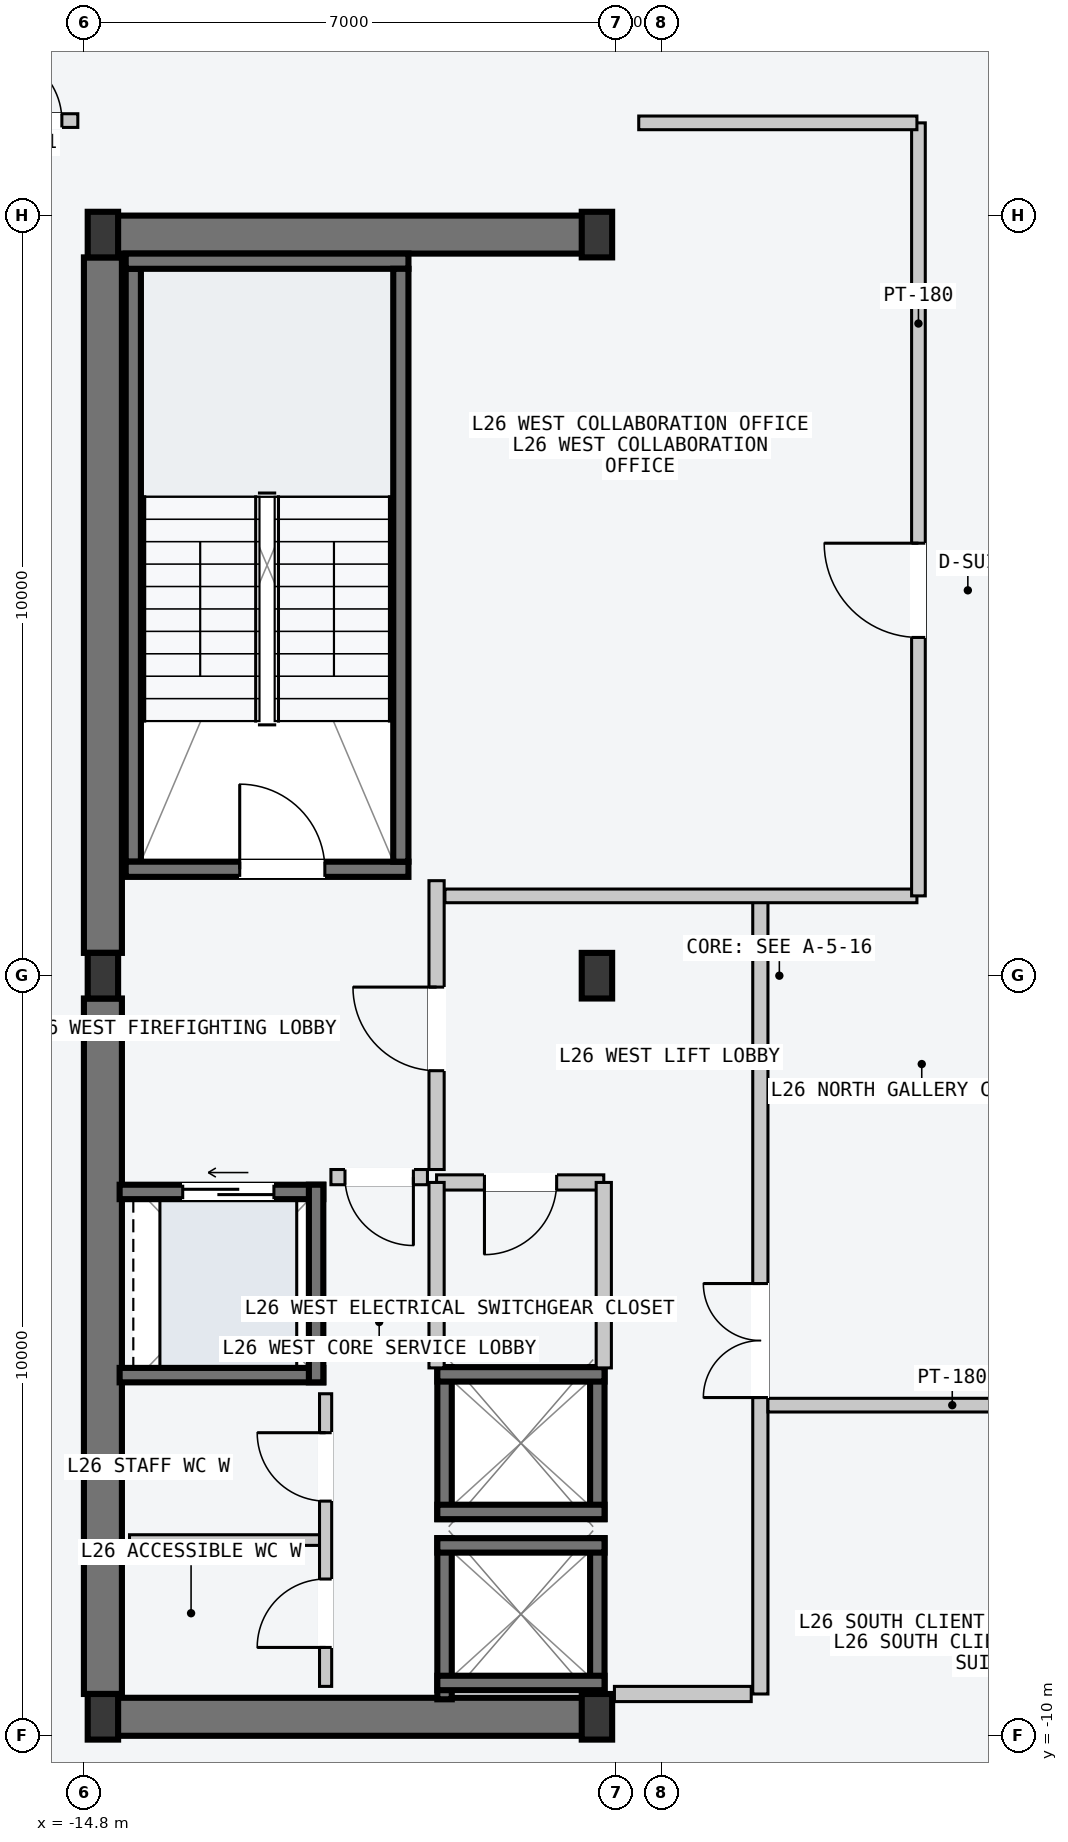
"""IFC4 building model, lengths in metres.
Left out: names, types, materials, properties, quantities, classifications, styles, units other than length and angle.
Written with IfcOpenShell. Run it as: python <this file> out.ifc"""

import sys

from ifc_helpers import new_model, si_unit, direction, frame, frame_2d, origin, origin_2d, place, context, subcontext, project, spatial, rectangle, i_section, extrude, element, fill, save


model = new_model("IFC4")
c1 = context("Model", 3, precision=1e-05, world=origin(), true_north=direction((0.0, 1.0)))
c2 = subcontext(c1, "Body", "Model", "MODEL_VIEW")
j1 = project(units=[si_unit("LENGTHUNIT", "METRE"), si_unit("PLANEANGLEUNIT", "RADIAN")], contexts=[c1])
p1 = place(None, origin())
s1 = spatial("IfcSite", under=j1, at=p1, CompositionType="ELEMENT")
p2 = place(p1, origin())
s2 = spatial("IfcBuilding", under=s1, at=p2, CompositionType="ELEMENT")
p3 = place(p2, frame((0.0, 0.0, 102.6)))
s3 = spatial("IfcBuildingStorey", under=s2, at=p3, CompositionType="ELEMENT", Elevation=102.6)
for number, where, z_axis, x_axis in (
    (1, (-14.53, -9.75, -0.2), (0.0, 0.0, 1.0), (1.0, 0.0, 0.0)),
    (2, (-14.53, 9.75, -0.2), (0.0, 0.0, 1.0), (1.0, 0.0, 0.0)),
):
    element("IfcWall", number, at=place(p3, frame(where, z_axis=z_axis, x_axis=x_axis)), inside=s3, PredefinedType="SHEAR", context=c2, shape_type="SweptSolid", body=[
        extrude(rectangle(XDim=6.46, YDim=0.5, at=frame_2d((3.23, 0.0))), origin(), (0.0, 0.0, 1.0), 3.6),
    ])
for number, where, z_axis, x_axis in (
    (3, (-14.55, -9.45, -0.2), (0.0, 0.0, 1.0), (0.0, 1.0, 0.0)),
    (4, (-14.55, 0.3, -0.2), (0.0, 0.0, 1.0), (0.0, 1.0, 0.0)),
):
    element("IfcWall", number, at=place(p3, frame(where, z_axis=z_axis, x_axis=x_axis)), inside=s3, PredefinedType="SHEAR", context=c2, shape_type="SweptSolid", body=[
        extrude(rectangle(XDim=9.15, YDim=0.5, at=frame_2d((4.575, 0.0))), origin(), (0.0, 0.0, 1.0), 3.6),
    ])
p4 = place(p3, frame((-14.15, 1.5, -0.2), z_axis=(0.0, 0.0, 1.0), x_axis=(0.0, 1.0, 0.0)))
e5 = element("IfcWall", 5, at=p4, inside=s3, PredefinedType="SOLIDWALL", context=c2, shape_type="SweptSolid", body=[
    extrude(rectangle(XDim=7.8, YDim=0.2, at=frame_2d((3.9, 0.0))), origin(), (0.0, 0.0, 1.0), 3.6),
])
p5 = place(p3, frame((-14.25, 1.4, -0.2), z_axis=(0.0, 0.0, 1.0), x_axis=(1.0, 0.0, 0.0)))
e6 = element("IfcWall", 6, at=p5, inside=s3, PredefinedType="SOLIDWALL", context=c2, shape_type="SweptSolid", body=[
    extrude(rectangle(XDim=3.72, YDim=0.2, at=frame_2d((1.86, 0.0))), origin(), (0.0, 0.0, 1.0), 3.6),
])
p6 = place(p5, frame((1.5, 0.0, 0.2)))
e7 = element("IfcOpeningElement", 7, at=p6, cuts=e6, PredefinedType="OPENING", context=c2, shape_type="SweptSolid", body=[
    extrude(rectangle(XDim=1.12, YDim=2.18, at=frame_2d((0.56, 1.09))), frame((0.0, 0.11, 0.0), z_axis=(0.0, -1.0, 0.0), x_axis=(1.0, 0.0, 0.0)), (0.0, 0.0, 1.0), 0.22),
])
p7 = place(p3, frame((-14.25, 9.4, -0.2), z_axis=(0.0, 0.0, 1.0), x_axis=(1.0, 0.0, 0.0)))
e8 = element("IfcWall", 8, at=p7, inside=s3, PredefinedType="SOLIDWALL", context=c2, shape_type="SweptSolid", body=[
    extrude(rectangle(XDim=3.72, YDim=0.2, at=frame_2d((1.86, 0.0))), origin(), (0.0, 0.0, 1.0), 3.6),
])
p8 = place(p3, frame((-10.63, 1.5, -0.2), z_axis=(0.0, 0.0, 1.0), x_axis=(0.0, 1.0, 0.0)))
e9 = element("IfcWall", 9, at=p8, inside=s3, PredefinedType="SOLIDWALL", context=c2, shape_type="SweptSolid", body=[
    extrude(rectangle(XDim=7.8, YDim=0.2, at=frame_2d((3.9, 0.0))), origin(), (0.0, 0.0, 1.0), 3.6),
])
for number, where, z_axis, x_axis in (
    (10, (-14.55, -9.75, 0.0), (0.0, 0.0, 1.0), (1.0, 0.0, 0.0)),
    (11, (-14.55, 0.0, 0.0), (0.0, 0.0, 1.0), (1.0, 0.0, 0.0)),
    (12, (-14.55, 9.75, 0.0), (0.0, 0.0, 1.0), (1.0, 0.0, 0.0)),
    (13, (-8.05, -9.75, 0.0), (0.0, 0.0, 1.0), (1.0, 0.0, 0.0)),
    (14, (-8.05, 0.0, 0.0), (0.0, 0.0, 1.0), (1.0, 0.0, 0.0)),
    (15, (-8.05, 9.75, 0.0), (0.0, 0.0, 1.0), (1.0, 0.0, 0.0)),
):
    element("IfcColumn", number, at=place(p3, frame(where, z_axis=z_axis, x_axis=x_axis)), inside=s3, PredefinedType="COLUMN", context=c2, shape_type="SweptSolid", body=[
        extrude(i_section(OverallWidth=0.4, OverallDepth=0.6, WebThickness=0.022, FlangeThickness=0.036, at=origin_2d()), origin(), (0.0, 0.0, 1.0), 3.6),
    ])
for number, where, z_axis, x_axis in (
    (16, (-8.045, -9.52, -0.2), (0.0, 0.0, 1.0), (0.0, 1.0, 0.0)),
    (17, (-10.055, -9.52, -0.2), (0.0, 0.0, 1.0), (0.0, 1.0, 0.0)),
):
    element("IfcWall", number, at=place(p3, frame(where, z_axis=z_axis, x_axis=x_axis)), inside=s3, PredefinedType="SOLIDWALL", context=c2, shape_type="SweptSolid", body=[
        extrude(rectangle(XDim=2.12, YDim=0.19, at=frame_2d((1.06, 0.0))), origin(), (0.0, 0.0, 1.0), 3.6),
    ])
for number, where, z_axis, x_axis in (
    (18, (-10.15, -7.495, -0.2), (0.0, 0.0, 1.0), (1.0, 0.0, 0.0)),
    (19, (-10.15, -9.305, -0.2), (0.0, 0.0, 1.0), (1.0, 0.0, 0.0)),
):
    element("IfcWall", number, at=place(p3, frame(where, z_axis=z_axis, x_axis=x_axis)), inside=s3, PredefinedType="SOLIDWALL", context=c2, shape_type="SweptSolid", body=[
        extrude(rectangle(XDim=2.2, YDim=0.19, at=frame_2d((1.1, 0.0))), origin(), (0.0, 0.0, 1.0), 3.6),
    ])
for number, where, z_axis, x_axis in (
    (20, (-8.045, -7.15, -0.2), (0.0, 0.0, 1.0), (0.0, 1.0, 0.0)),
    (21, (-10.055, -7.15, -0.2), (0.0, 0.0, 1.0), (0.0, 1.0, 0.0)),
):
    element("IfcWall", number, at=place(p3, frame(where, z_axis=z_axis, x_axis=x_axis)), inside=s3, PredefinedType="SOLIDWALL", context=c2, shape_type="SweptSolid", body=[
        extrude(rectangle(XDim=2.0, YDim=0.19, at=frame_2d((1.0, 0.0))), origin(), (0.0, 0.0, 1.0), 3.6),
    ])
for number, where, z_axis, x_axis in (
    (22, (-10.15, -5.245, -0.2), (0.0, 0.0, 1.0), (1.0, 0.0, 0.0)),
    (23, (-10.15, -7.055, -0.2), (0.0, 0.0, 1.0), (1.0, 0.0, 0.0)),
):
    element("IfcWall", number, at=place(p3, frame(where, z_axis=z_axis, x_axis=x_axis)), inside=s3, PredefinedType="SOLIDWALL", context=c2, shape_type="SweptSolid", body=[
        extrude(rectangle(XDim=2.2, YDim=0.19, at=frame_2d((1.1, 0.0))), origin(), (0.0, 0.0, 1.0), 3.6),
    ])
p9 = place(p3, frame((-14.33, -2.845, -0.2), z_axis=(0.0, 0.0, 1.0), x_axis=(1.0, 0.0, 0.0)))
e24 = element("IfcWall", 24, at=p9, inside=s3, PredefinedType="SOLIDWALL", context=c2, shape_type="SweptSolid", body=[
    extrude(rectangle(XDim=2.68, YDim=0.19, at=frame_2d((1.34, 0.0))), origin(), (0.0, 0.0, 1.0), 3.6),
])
p10 = place(p9, frame((0.83, 0.0, 0.2)))
e25 = element("IfcOpeningElement", 25, at=p10, cuts=e24, PredefinedType="OPENING", context=c2, shape_type="SweptSolid", body=[
    extrude(rectangle(XDim=1.2, YDim=2.2, at=frame_2d((0.6, 1.1))), frame((0.0, 0.105, 0.0), z_axis=(0.0, -1.0, 0.0), x_axis=(1.0, 0.0, 0.0)), (0.0, 0.0, 1.0), 0.21),
])
p11 = place(p3, frame((-14.33, -5.255, -0.2), z_axis=(0.0, 0.0, 1.0), x_axis=(1.0, 0.0, 0.0)))
e26 = element("IfcWall", 26, at=p11, inside=s3, PredefinedType="SOLIDWALL", context=c2, shape_type="SweptSolid", body=[
    extrude(rectangle(XDim=2.68, YDim=0.19, at=frame_2d((1.34, 0.0))), origin(), (0.0, 0.0, 1.0), 3.6),
])
p12 = place(p3, frame((-11.745, -5.35, -0.2), z_axis=(0.0, 0.0, 1.0), x_axis=(0.0, 1.0, 0.0)))
e27 = element("IfcWall", 27, at=p12, inside=s3, PredefinedType="SOLIDWALL", context=c2, shape_type="SweptSolid", body=[
    extrude(rectangle(XDim=2.6, YDim=0.19, at=frame_2d((1.3, 0.0))), origin(), (0.0, 0.0, 1.0), 3.6),
])
p13 = place(p3, frame((-5.9, -9.45, 0.0), z_axis=(0.0, 0.0, 1.0), x_axis=(0.0, 1.0, 0.0)))
e28 = element("IfcWall", 28, at=p13, inside=s3, PredefinedType="PARTITIONING", context=c2, shape_type="SweptSolid", body=[
    extrude(rectangle(XDim=10.5, YDim=0.2, at=frame_2d((5.25, 0.0))), origin(), (0.0, 0.0, 1.0), 3.4),
])
p14 = place(p13, frame((3.9, 0.0, 0.0)))
e29 = element("IfcOpeningElement", 29, at=p14, cuts=e28, PredefinedType="OPENING", context=c2, shape_type="SweptSolid", body=[
    extrude(rectangle(XDim=1.5, YDim=2.2, at=frame_2d((0.75, 1.1))), frame((0.0, 0.11, 0.0), z_axis=(0.0, -1.0, 0.0), x_axis=(1.0, 0.0, 0.0)), (0.0, 0.0, 1.0), 0.22),
])
p15 = place(p3, frame((-6.02, -9.45, 0.0), z_axis=(0.0, 0.0, 1.0), x_axis=(-1.0, 0.0, 0.0)))
e30 = element("IfcWall", 30, at=p15, inside=s3, PredefinedType="PARTITIONING", context=c2, shape_type="SweptSolid", body=[
    extrude(rectangle(XDim=1.8, YDim=0.2, at=frame_2d((0.9, 0.0))), origin(), (0.0, 0.0, 1.0), 3.4),
])
p16 = place(p3, frame((-10.16, -2.55, 0.0), z_axis=(0.0, 0.0, 1.0), x_axis=(0.0, 1.0, 0.0)))
e31 = element("IfcWall", 31, at=p16, inside=s3, PredefinedType="PARTITIONING", context=c2, shape_type="SweptSolid", body=[
    extrude(rectangle(XDim=3.8, YDim=0.2, at=frame_2d((1.9, 0.0))), origin(), (0.0, 0.0, 1.0), 3.4),
])
p17 = place(p16, frame((1.3, 0.0, 0.0)))
e32 = element("IfcOpeningElement", 32, at=p17, cuts=e31, PredefinedType="OPENING", context=c2, shape_type="SweptSolid", body=[
    extrude(rectangle(XDim=1.1, YDim=2.15, at=frame_2d((0.55, 1.075))), frame((0.0, 0.11, 0.0), z_axis=(0.0, -1.0, 0.0), x_axis=(1.0, 0.0, 0.0)), (0.0, 0.0, 1.0), 0.22),
])
p18 = place(p3, frame((-10.28, -2.65, 0.0), z_axis=(0.0, 0.0, 1.0), x_axis=(-1.0, 0.0, 0.0)))
e33 = element("IfcWall", 33, at=p18, inside=s3, PredefinedType="PARTITIONING", context=c2, shape_type="SweptSolid", body=[
    extrude(rectangle(XDim=1.27, YDim=0.2, at=frame_2d((0.635, 0.0))), origin(), (0.0, 0.0, 1.0), 3.4),
])
p19 = place(p18, frame((0.185, 0.0, 0.0)))
e34 = element("IfcOpeningElement", 34, at=p19, cuts=e33, PredefinedType="OPENING", context=c2, shape_type="SweptSolid", body=[
    extrude(rectangle(XDim=0.9, YDim=2.15, at=frame_2d((0.45, 1.075))), frame((0.0, 0.11, 0.0), z_axis=(0.0, -1.0, 0.0), x_axis=(1.0, 0.0, 0.0)), (0.0, 0.0, 1.0), 0.22),
])
p20 = place(p3, frame((-7.96, -2.72, 0.0), z_axis=(0.0, 0.0, 1.0), x_axis=(-1.0, 0.0, 0.0)))
e35 = element("IfcWall", 35, at=p20, inside=s3, PredefinedType="PARTITIONING", context=c2, shape_type="SweptSolid", body=[
    extrude(rectangle(XDim=2.2, YDim=0.2, at=frame_2d((1.1, 0.0))), origin(), (0.0, 0.0, 1.0), 3.4),
])
p21 = place(p20, frame((0.62, 0.0, 0.0)))
e36 = element("IfcOpeningElement", 36, at=p21, cuts=e35, PredefinedType="OPENING", context=c2, shape_type="SweptSolid", body=[
    extrude(rectangle(XDim=0.95, YDim=2.1, at=frame_2d((0.475, 1.05))), frame((0.0, 0.11, 0.0), z_axis=(0.0, -1.0, 0.0), x_axis=(1.0, 0.0, 0.0)), (0.0, 0.0, 1.0), 0.22),
])
for number, where, z_axis, x_axis in (
    (37, (-7.96, -5.16, 0.0), (0.0, 0.0, 1.0), (0.0, 1.0, 0.0)),
    (38, (-10.16, -5.16, 0.0), (0.0, 0.0, 1.0), (0.0, 1.0, 0.0)),
):
    element("IfcWall", number, at=place(p3, frame(where, z_axis=z_axis, x_axis=x_axis)), inside=s3, PredefinedType="PARTITIONING", context=c2, shape_type="SweptSolid", body=[
        extrude(rectangle(XDim=2.44, YDim=0.2, at=frame_2d((1.22, 0.0))), origin(), (0.0, 0.0, 1.0), 3.4),
    ])
p22 = place(p3, frame((-11.7, -7.425, 0.0), z_axis=(0.0, 0.0, 1.0), x_axis=(-1.0, 0.0, 0.0)))
e39 = element("IfcWall", 39, at=p22, inside=s3, PredefinedType="PARTITIONING", context=c2, shape_type="SweptSolid", body=[
    extrude(rectangle(XDim=2.5, YDim=0.14, at=frame_2d((1.25, 0.0))), origin(), (0.0, 0.0, 1.0), 3.4),
])
p23 = place(p3, frame((-11.62, -9.35, 0.0), z_axis=(0.0, 0.0, 1.0), x_axis=(0.0, 1.0, 0.0)))
e40 = element("IfcWall", 40, at=p23, inside=s3, PredefinedType="PARTITIONING", context=c2, shape_type="SweptSolid", body=[
    extrude(rectangle(XDim=3.85, YDim=0.16, at=frame_2d((1.925, 0.0))), origin(), (0.0, 0.0, 1.0), 3.4),
])
p24 = place(p23, frame((0.512, 0.0, 0.0)))
e41 = element("IfcOpeningElement", 41, at=p24, cuts=e40, PredefinedType="OPENING", context=c2, shape_type="SweptSolid", body=[
    extrude(rectangle(XDim=0.9, YDim=2.15, at=frame_2d((0.45, 1.075))), frame((0.0, 0.09, 0.0), z_axis=(0.0, -1.0, 0.0), x_axis=(1.0, 0.0, 0.0)), (0.0, 0.0, 1.0), 0.18),
])
p25 = place(p23, frame((2.438, 0.0, 0.0)))
e42 = element("IfcOpeningElement", 42, at=p25, cuts=e40, PredefinedType="OPENING", context=c2, shape_type="SweptSolid", body=[
    extrude(rectangle(XDim=0.9, YDim=2.15, at=frame_2d((0.45, 1.075))), frame((0.0, 0.09, 0.0), z_axis=(0.0, -1.0, 0.0), x_axis=(1.0, 0.0, 0.0)), (0.0, 0.0, 1.0), 0.18),
])
p26 = place(p3, frame((-10.05, 1.05, 0.0), z_axis=(0.0, 0.0, 1.0), x_axis=(1.0, 0.0, 0.0)))
e43 = element("IfcWall", 43, at=p26, inside=s3, PredefinedType="PARTITIONING", context=c2, shape_type="SweptSolid", body=[
    extrude(rectangle(XDim=6.21, YDim=0.18, at=frame_2d((3.105, 0.0))), origin(), (0.0, 0.0, 1.0), 3.4),
])
p27 = place(p3, frame((-3.82, 1.05, 0.0), z_axis=(0.0, 0.0, 1.0), x_axis=(0.0, 1.0, 0.0)))
e44 = element("IfcWall", 44, at=p27, inside=s3, PredefinedType="PARTITIONING", context=c2, shape_type="SweptSolid", body=[
    extrude(rectangle(XDim=10.17, YDim=0.18, at=frame_2d((5.085, 0.0))), origin(), (0.0, 0.0, 1.0), 3.4),
])
p28 = place(p27, frame((3.4, 0.0, 0.0)))
e45 = element("IfcOpeningElement", 45, at=p28, cuts=e44, PredefinedType="OPENING", context=c2, shape_type="SweptSolid", body=[
    extrude(rectangle(XDim=1.24, YDim=2.24, at=frame_2d((0.62, 1.12))), frame((0.0, 0.1, 0.0), z_axis=(0.0, -1.0, 0.0), x_axis=(1.0, 0.0, 0.0)), (0.0, 0.0, 1.0), 0.2),
])
p29 = place(p3, frame((-7.5, 11.22, 0.0), z_axis=(0.0, 0.0, 1.0), x_axis=(1.0, 0.0, 0.0)))
e46 = element("IfcWall", 46, at=p29, inside=s3, PredefinedType="PARTITIONING", context=c2, shape_type="SweptSolid", body=[
    extrude(rectangle(XDim=3.66, YDim=0.18, at=frame_2d((1.83, 0.0))), origin(), (0.0, 0.0, 1.0), 3.4),
])
p30 = place(p3, frame((-5.8, -5.65, 0.0), z_axis=(0.0, 0.0, 1.0), x_axis=(1.0, 0.0, 0.0)))
e47 = element("IfcWall", 47, at=p30, inside=s3, PredefinedType="PARTITIONING", context=c2, shape_type="SweptSolid", body=[
    extrude(rectangle(XDim=11.6, YDim=0.18, at=frame_2d((5.8, 0.0))), origin(), (0.0, 0.0, 1.0), 3.4),
])
p31 = place(p30, frame((5.1, 0.0, 0.0)))
e48 = element("IfcOpeningElement", 48, at=p31, cuts=e47, PredefinedType="OPENING", context=c2, shape_type="SweptSolid", body=[
    extrude(rectangle(XDim=1.4, YDim=2.2, at=frame_2d((0.7, 1.1))), frame((0.0, 0.1, 0.0), z_axis=(0.0, -1.0, 0.0), x_axis=(1.0, 0.0, 0.0)), (0.0, 0.0, 1.0), 0.2),
])
p32 = place(p3, frame((-16.2, 11.25, 0.0), z_axis=(0.0, 0.0, 1.0), x_axis=(1.0, 0.0, 0.0)))
e49 = element("IfcWall", 49, at=p32, inside=s3, PredefinedType="PARTITIONING", context=c2, shape_type="SweptSolid", body=[
    extrude(rectangle(XDim=1.32, YDim=0.18, at=frame_2d((0.66, 0.0))), origin(), (0.0, 0.0, 1.0), 3.4),
])
p33 = place(p32, frame((0.21, 0.0, 0.0)))
e50 = element("IfcOpeningElement", 50, at=p33, cuts=e49, PredefinedType="OPENING", context=c2, shape_type="SweptSolid", body=[
    extrude(rectangle(XDim=0.9, YDim=2.15, at=frame_2d((0.45, 1.075))), frame((0.0, 0.1, 0.0), z_axis=(0.0, -1.0, 0.0), x_axis=(1.0, 0.0, 0.0)), (0.0, 0.0, 1.0), 0.2),
])
p34 = place(p6, origin())
e51 = element("IfcDoor", 51, at=p34, inside=s3, OperationType="SINGLE_SWING_LEFT", PredefinedType="DOOR", context=c2, shape_type="SweptSolid", body=[
    extrude(rectangle(XDim=1.12, YDim=2.18, at=frame_2d((0.56, 1.09))), frame((0.0, 0.025, 0.0), z_axis=(0.0, -1.0, 0.0), x_axis=(1.0, 0.0, 0.0)), (0.0, 0.0, 1.0), 0.05),
])
fill(e7, e51)
p35 = place(p10, origin())
e52 = element("IfcDoor", 52, at=p35, inside=s3, OperationType="SLIDING_TO_LEFT", PredefinedType="DOOR", context=c2, shape_type="SweptSolid", body=[
    extrude(rectangle(XDim=1.2, YDim=2.2, at=frame_2d((0.6, 1.1))), frame((0.0, 0.025, 0.0), z_axis=(0.0, -1.0, 0.0), x_axis=(1.0, 0.0, 0.0)), (0.0, 0.0, 1.0), 0.05),
])
fill(e25, e52)
p36 = place(p14, origin())
e53 = element("IfcDoor", 53, at=p36, inside=s3, OperationType="DOUBLE_DOOR_SINGLE_SWING", PredefinedType="DOOR", context=c2, shape_type="SweptSolid", body=[
    extrude(rectangle(XDim=1.5, YDim=2.2, at=frame_2d((0.75, 1.1))), frame((0.0, 0.025, 0.0), z_axis=(0.0, -1.0, 0.0), x_axis=(1.0, 0.0, 0.0)), (0.0, 0.0, 1.0), 0.05),
])
fill(e29, e53)
p37 = place(p17, origin())
e54 = element("IfcDoor", 54, at=p37, inside=s3, OperationType="SINGLE_SWING_RIGHT", PredefinedType="DOOR", context=c2, shape_type="SweptSolid", body=[
    extrude(rectangle(XDim=1.1, YDim=2.15, at=frame_2d((0.55, 1.075))), frame((0.0, 0.025, 0.0), z_axis=(0.0, -1.0, 0.0), x_axis=(1.0, 0.0, 0.0)), (0.0, 0.0, 1.0), 0.05),
])
fill(e32, e54)
p38 = place(p19, origin())
e55 = element("IfcDoor", 55, at=p38, inside=s3, OperationType="SINGLE_SWING_LEFT", PredefinedType="DOOR", context=c2, shape_type="SweptSolid", body=[
    extrude(rectangle(XDim=0.9, YDim=2.15, at=frame_2d((0.45, 1.075))), frame((0.0, 0.025, 0.0), z_axis=(0.0, -1.0, 0.0), x_axis=(1.0, 0.0, 0.0)), (0.0, 0.0, 1.0), 0.05),
])
fill(e34, e55)
p39 = place(p21, origin())
e56 = element("IfcDoor", 56, at=p39, inside=s3, OperationType="SINGLE_SWING_RIGHT", PredefinedType="DOOR", context=c2, shape_type="SweptSolid", body=[
    extrude(rectangle(XDim=0.95, YDim=2.1, at=frame_2d((0.475, 1.05))), frame((0.0, 0.025, 0.0), z_axis=(0.0, -1.0, 0.0), x_axis=(1.0, 0.0, 0.0)), (0.0, 0.0, 1.0), 0.05),
])
fill(e36, e56)
p40 = place(p24, origin())
e57 = element("IfcDoor", 57, at=p40, inside=s3, OperationType="SINGLE_SWING_LEFT", PredefinedType="DOOR", context=c2, shape_type="SweptSolid", body=[
    extrude(rectangle(XDim=0.9, YDim=2.15, at=frame_2d((0.45, 1.075))), frame((0.0, 0.025, 0.0), z_axis=(0.0, -1.0, 0.0), x_axis=(1.0, 0.0, 0.0)), (0.0, 0.0, 1.0), 0.05),
])
fill(e41, e57)
p41 = place(p25, origin())
e58 = element("IfcDoor", 58, at=p41, inside=s3, OperationType="SINGLE_SWING_RIGHT", PredefinedType="DOOR", context=c2, shape_type="SweptSolid", body=[
    extrude(rectangle(XDim=0.9, YDim=2.15, at=frame_2d((0.45, 1.075))), frame((0.0, 0.025, 0.0), z_axis=(0.0, -1.0, 0.0), x_axis=(1.0, 0.0, 0.0)), (0.0, 0.0, 1.0), 0.05),
])
fill(e42, e58)
p42 = place(p28, origin())
e59 = element("IfcDoor", 59, at=p42, inside=s3, OperationType="SINGLE_SWING_RIGHT", PredefinedType="DOOR", context=c2, shape_type="SweptSolid", body=[
    extrude(rectangle(XDim=1.24, YDim=2.24, at=frame_2d((0.62, 1.12))), frame((0.0, 0.025, 0.0), z_axis=(0.0, -1.0, 0.0), x_axis=(1.0, 0.0, 0.0)), (0.0, 0.0, 1.0), 0.05),
])
fill(e45, e59)
p43 = place(p33, origin())
e60 = element("IfcDoor", 60, at=p43, inside=s3, OperationType="SINGLE_SWING_LEFT", PredefinedType="DOOR", context=c2, shape_type="SweptSolid", body=[
    extrude(rectangle(XDim=0.9, YDim=2.15, at=frame_2d((0.45, 1.075))), frame((0.0, 0.025, 0.0), z_axis=(0.0, -1.0, 0.0), x_axis=(1.0, 0.0, 0.0)), (0.0, 0.0, 1.0), 0.05),
])
fill(e50, e60)
save(model, sys.argv[1])
